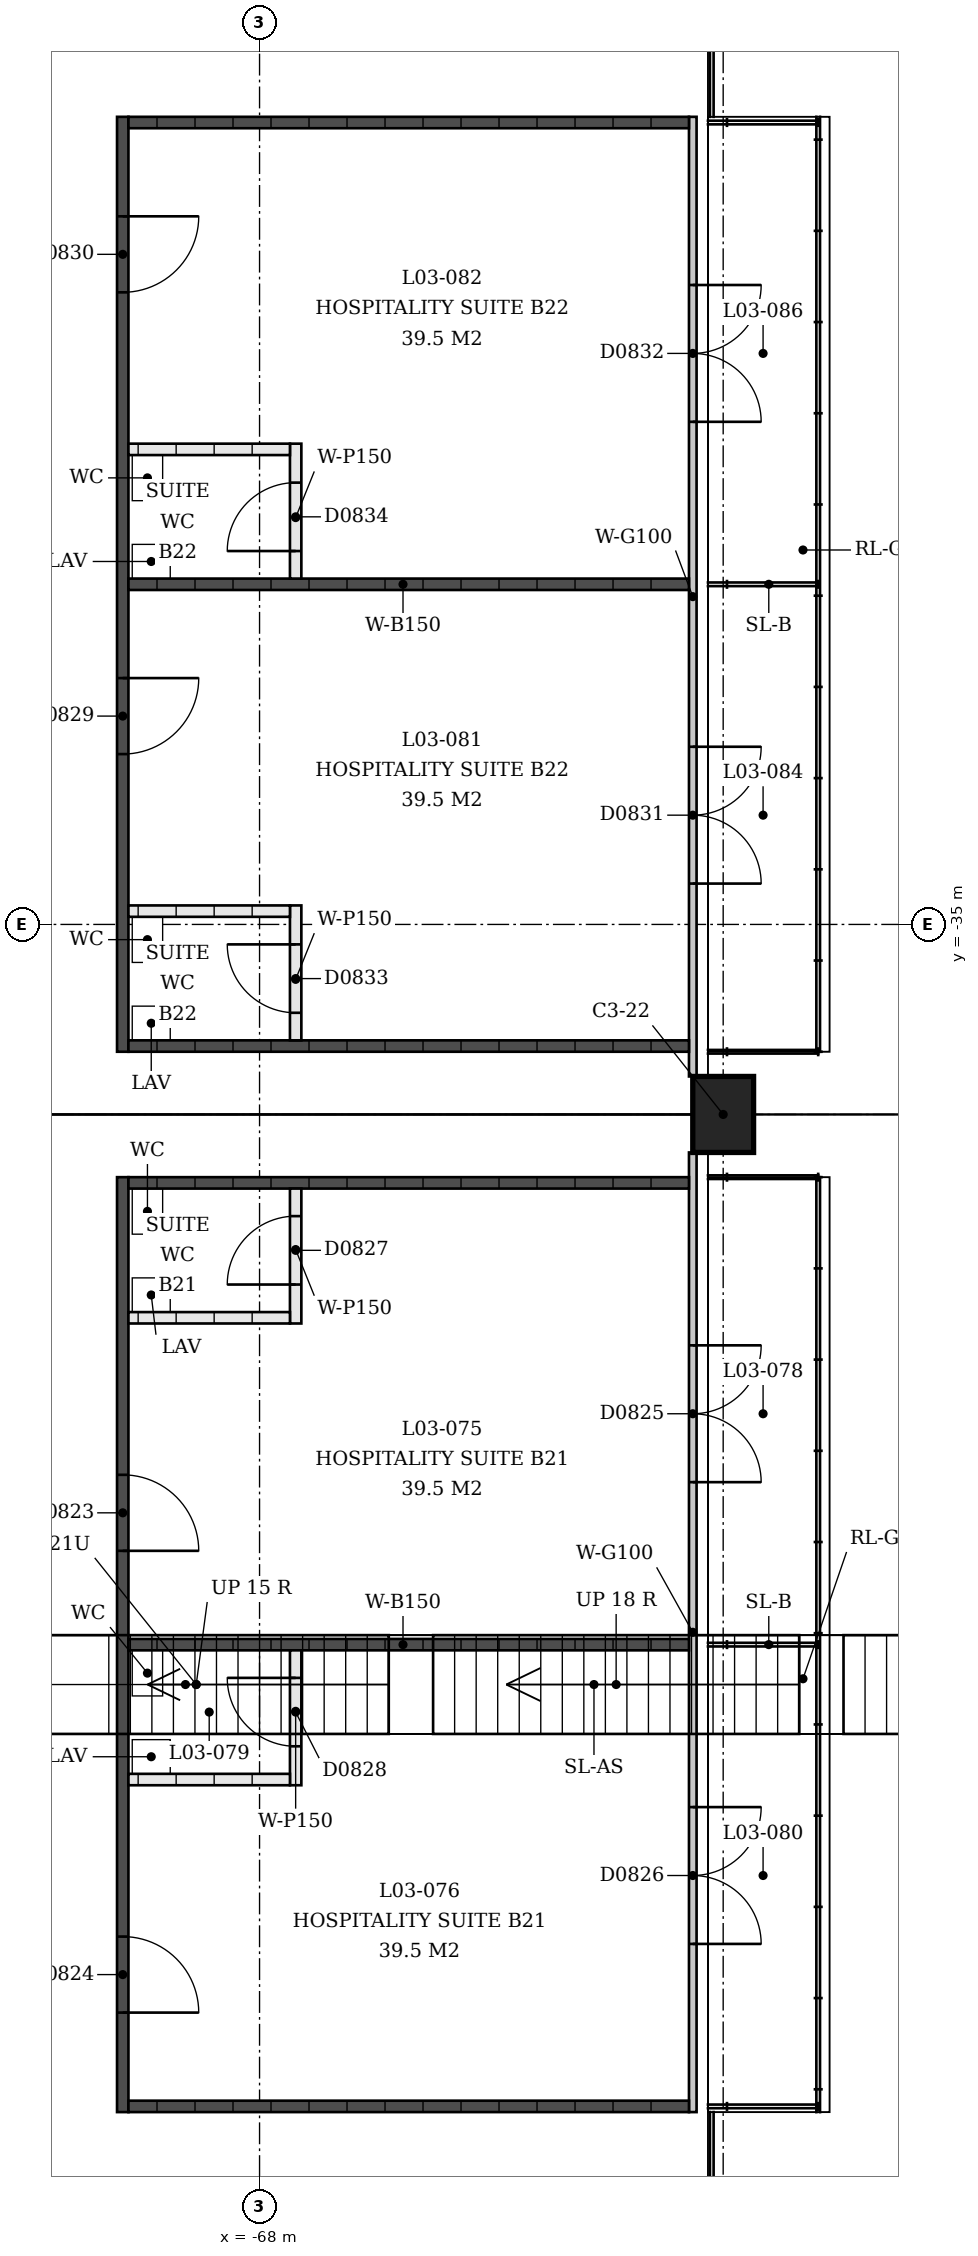
"""IFC4 building model, lengths in metres.
Left out: names, types, materials, properties, quantities, classifications, styles, units other than length and angle.
Written with IfcOpenShell. Run it as: python <this file> out.ifc"""

import sys

from ifc_helpers import new_model, si_unit, direction, frame, frame_2d, origin, origin_2d, place, context, subcontext, project, spatial, rectangle, extrude, element, fill, save


model = new_model("IFC4")
c1 = context("Model", 3, precision=1e-05, world=origin(), true_north=direction((0.0, 1.0)))
c2 = subcontext(c1, "Body", "Model", "MODEL_VIEW")
j1 = project(units=[si_unit("LENGTHUNIT", "METRE"), si_unit("PLANEANGLEUNIT", "RADIAN")], contexts=[c1])
p1 = place(None, origin())
s1 = spatial("IfcSite", under=j1, at=p1, CompositionType="ELEMENT")
p2 = place(p1, origin())
s2 = spatial("IfcBuilding", under=s1, at=p2, CompositionType="ELEMENT")
p3 = place(p2, frame((0.0, 0.0, 13.5)))
s3 = spatial("IfcBuildingStorey", under=s2, at=p3, CompositionType="ELEMENT", Elevation=13.5)
p4 = place(p3, frame((-61.9, -37.5, 0.0), z_axis=(0.0, 0.0, 1.0), x_axis=(0.0, -1.0, 0.0)))
e1 = element("IfcColumn", 1, at=p4, inside=s3, PredefinedType="COLUMN", context=c2, shape_type="SweptSolid", body=[
    extrude(rectangle(XDim=1.0, YDim=0.8, at=origin_2d()), origin(), (0.0, 0.0, 1.0), 2.033),
])
p5 = place(p3, frame((-62.3, -38.0, 0.0), z_axis=(0.0, 0.0, 1.0), x_axis=(0.0, -1.0, 0.0)))
e2 = element("IfcWall", 2, at=p5, inside=s3, PredefinedType="PARTITIONING", context=c2, shape_type="SweptSolid", body=[
    extrude(rectangle(XDim=12.625, YDim=0.1, at=frame_2d((6.312, 0.0))), origin(), (0.0, 0.0, 1.0), 3.0),
])
p6 = place(p5, frame((2.538, 0.0, 0.0)))
e3 = element("IfcOpeningElement", 3, at=p6, cuts=e2, PredefinedType="OPENING", context=c2, shape_type="SweptSolid", body=[
    extrude(rectangle(XDim=1.8, YDim=2.1, at=frame_2d((0.9, 1.05))), frame((0.0, 0.05, 0.0), z_axis=(0.0, -1.0, 0.0), x_axis=(1.0, 0.0, 0.0)), (0.0, 0.0, 1.0), 0.1),
])
p7 = place(p5, frame((8.613, 0.0, 0.0)))
e4 = element("IfcOpeningElement", 4, at=p7, cuts=e2, PredefinedType="OPENING", context=c2, shape_type="SweptSolid", body=[
    extrude(rectangle(XDim=1.8, YDim=2.1, at=frame_2d((0.9, 1.05))), frame((0.0, 0.05, 0.0), z_axis=(0.0, -1.0, 0.0), x_axis=(1.0, 0.0, 0.0)), (0.0, 0.0, 1.0), 0.1),
])
p8 = place(p3, frame((-69.8, -38.325, 0.0), z_axis=(0.0, 0.0, 1.0), x_axis=(0.0, -1.0, 0.0)))
e5 = element("IfcWall", 5, at=p8, inside=s3, PredefinedType="SOLIDWALL", context=c2, shape_type="SweptSolid", body=[
    extrude(rectangle(XDim=12.3, YDim=0.15, at=frame_2d((6.15, 0.0))), origin(), (0.0, 0.0, 1.0), 3.0),
])
p9 = place(p8, frame((3.916, 0.0, 0.0)))
e6 = element("IfcOpeningElement", 6, at=p9, cuts=e5, PredefinedType="OPENING", context=c2, shape_type="SweptSolid", body=[
    extrude(rectangle(XDim=1.0, YDim=2.1, at=frame_2d((0.5, 1.05))), frame((0.0, 0.075, 0.0), z_axis=(0.0, -1.0, 0.0), x_axis=(1.0, 0.0, 0.0)), (0.0, 0.0, 1.0), 0.15),
])
p10 = place(p8, frame((9.991, 0.0, 0.0)))
e7 = element("IfcOpeningElement", 7, at=p10, cuts=e5, PredefinedType="OPENING", context=c2, shape_type="SweptSolid", body=[
    extrude(rectangle(XDim=1.0, YDim=2.1, at=frame_2d((0.5, 1.05))), frame((0.0, 0.075, 0.0), z_axis=(0.0, -1.0, 0.0), x_axis=(1.0, 0.0, 0.0)), (0.0, 0.0, 1.0), 0.15),
])
for number, where, z_axis, x_axis in (
    (8, (-62.35, -38.4, 0.0), (0.0, 0.0, 1.0), (-1.0, 0.0, 0.0)),
    (9, (-62.35, -44.475, 0.0), (0.0, 0.0, 1.0), (-1.0, 0.0, 0.0)),
    (10, (-62.35, -50.55, 0.0), (0.0, 0.0, 1.0), (-1.0, 0.0, 0.0)),
):
    element("IfcWall", number, at=place(p3, frame(where, z_axis=z_axis, x_axis=x_axis)), inside=s3, PredefinedType="SOLIDWALL", context=c2, shape_type="SweptSolid", body=[
        extrude(rectangle(XDim=7.375, YDim=0.15, at=frame_2d((3.688, 0.0))), origin(), (0.0, 0.0, 1.0), 3.0),
    ])
p11 = place(p3, frame((-67.525, -38.475, 0.0), z_axis=(0.0, 0.0, 1.0), x_axis=(0.0, -1.0, 0.0)))
e11 = element("IfcWall", 11, at=p11, inside=s3, PredefinedType="PARTITIONING", context=c2, shape_type="SweptSolid", body=[
    extrude(rectangle(XDim=1.775, YDim=0.15, at=frame_2d((0.887, 0.0))), origin(), (0.0, 0.0, 1.0), 3.0),
])
p12 = place(p11, frame((0.363, 0.0, 0.0)))
e12 = element("IfcOpeningElement", 12, at=p12, cuts=e11, PredefinedType="OPENING", context=c2, shape_type="SweptSolid", body=[
    extrude(rectangle(XDim=0.9, YDim=2.1, at=frame_2d((0.45, 1.05))), frame((0.0, 0.075, 0.0), z_axis=(0.0, -1.0, 0.0), x_axis=(1.0, 0.0, 0.0)), (0.0, 0.0, 1.0), 0.15),
])
p13 = place(p3, frame((-67.6, -40.175, 0.0), z_axis=(0.0, 0.0, 1.0), x_axis=(-1.0, 0.0, 0.0)))
e13 = element("IfcWall", 13, at=p13, inside=s3, PredefinedType="PARTITIONING", context=c2, shape_type="SweptSolid", body=[
    extrude(rectangle(XDim=2.125, YDim=0.15, at=frame_2d((1.062, 0.0))), origin(), (0.0, 0.0, 1.0), 3.0),
])
p14 = place(p3, frame((-67.525, -44.55, 0.0), z_axis=(0.0, 0.0, 1.0), x_axis=(0.0, -1.0, 0.0)))
e14 = element("IfcWall", 14, at=p14, inside=s3, PredefinedType="PARTITIONING", context=c2, shape_type="SweptSolid", body=[
    extrude(rectangle(XDim=1.775, YDim=0.15, at=frame_2d((0.887, 0.0))), origin(), (0.0, 0.0, 1.0), 3.0),
])
p15 = place(p14, frame((0.363, 0.0, 0.0)))
e15 = element("IfcOpeningElement", 15, at=p15, cuts=e14, PredefinedType="OPENING", context=c2, shape_type="SweptSolid", body=[
    extrude(rectangle(XDim=0.9, YDim=2.1, at=frame_2d((0.45, 1.05))), frame((0.0, 0.075, 0.0), z_axis=(0.0, -1.0, 0.0), x_axis=(1.0, 0.0, 0.0)), (0.0, 0.0, 1.0), 0.15),
])
p16 = place(p3, frame((-67.6, -46.25, 0.0), z_axis=(0.0, 0.0, 1.0), x_axis=(-1.0, 0.0, 0.0)))
e16 = element("IfcWall", 16, at=p16, inside=s3, PredefinedType="PARTITIONING", context=c2, shape_type="SweptSolid", body=[
    extrude(rectangle(XDim=2.125, YDim=0.15, at=frame_2d((1.062, 0.0))), origin(), (0.0, 0.0, 1.0), 3.0),
])
p17 = place(p3, frame((-62.3, -37.0, 0.0), z_axis=(0.0, 0.0, 1.0), x_axis=(0.0, 1.0, 0.0)))
e17 = element("IfcWall", 17, at=p17, inside=s3, PredefinedType="PARTITIONING", context=c2, shape_type="SweptSolid", body=[
    extrude(rectangle(XDim=12.625, YDim=0.1, at=frame_2d((6.312, 0.0))), origin(), (0.0, 0.0, 1.0), 3.0),
])
p18 = place(p17, frame((2.538, 0.0, 0.0)))
e18 = element("IfcOpeningElement", 18, at=p18, cuts=e17, PredefinedType="OPENING", context=c2, shape_type="SweptSolid", body=[
    extrude(rectangle(XDim=1.8, YDim=2.1, at=frame_2d((0.9, 1.05))), frame((0.0, 0.05, 0.0), z_axis=(0.0, -1.0, 0.0), x_axis=(1.0, 0.0, 0.0)), (0.0, 0.0, 1.0), 0.1),
])
p19 = place(p17, frame((8.613, 0.0, 0.0)))
e19 = element("IfcOpeningElement", 19, at=p19, cuts=e17, PredefinedType="OPENING", context=c2, shape_type="SweptSolid", body=[
    extrude(rectangle(XDim=1.8, YDim=2.1, at=frame_2d((0.9, 1.05))), frame((0.0, 0.05, 0.0), z_axis=(0.0, -1.0, 0.0), x_axis=(1.0, 0.0, 0.0)), (0.0, 0.0, 1.0), 0.1),
])
p20 = place(p3, frame((-69.8, -36.675, 0.0), z_axis=(0.0, 0.0, 1.0), x_axis=(0.0, 1.0, 0.0)))
e20 = element("IfcWall", 20, at=p20, inside=s3, PredefinedType="SOLIDWALL", context=c2, shape_type="SweptSolid", body=[
    extrude(rectangle(XDim=12.3, YDim=0.15, at=frame_2d((6.15, 0.0))), origin(), (0.0, 0.0, 1.0), 3.0),
])
p21 = place(p20, frame((3.916, 0.0, 0.0)))
e21 = element("IfcOpeningElement", 21, at=p21, cuts=e20, PredefinedType="OPENING", context=c2, shape_type="SweptSolid", body=[
    extrude(rectangle(XDim=1.0, YDim=2.1, at=frame_2d((0.5, 1.05))), frame((0.0, 0.075, 0.0), z_axis=(0.0, -1.0, 0.0), x_axis=(1.0, 0.0, 0.0)), (0.0, 0.0, 1.0), 0.15),
])
p22 = place(p20, frame((9.991, 0.0, 0.0)))
e22 = element("IfcOpeningElement", 22, at=p22, cuts=e20, PredefinedType="OPENING", context=c2, shape_type="SweptSolid", body=[
    extrude(rectangle(XDim=1.0, YDim=2.1, at=frame_2d((0.5, 1.05))), frame((0.0, 0.075, 0.0), z_axis=(0.0, -1.0, 0.0), x_axis=(1.0, 0.0, 0.0)), (0.0, 0.0, 1.0), 0.15),
])
for number, where, z_axis, x_axis in (
    (23, (-62.35, -36.6, 0.0), (0.0, 0.0, 1.0), (-1.0, 0.0, 0.0)),
    (24, (-62.35, -30.525, 0.0), (0.0, 0.0, 1.0), (-1.0, 0.0, 0.0)),
    (25, (-62.35, -24.45, 0.0), (0.0, 0.0, 1.0), (-1.0, 0.0, 0.0)),
):
    element("IfcWall", number, at=place(p3, frame(where, z_axis=z_axis, x_axis=x_axis)), inside=s3, PredefinedType="SOLIDWALL", context=c2, shape_type="SweptSolid", body=[
        extrude(rectangle(XDim=7.375, YDim=0.15, at=frame_2d((3.688, 0.0))), origin(), (0.0, 0.0, 1.0), 3.0),
    ])
p23 = place(p3, frame((-67.525, -36.525, 0.0), z_axis=(0.0, 0.0, 1.0), x_axis=(0.0, 1.0, 0.0)))
e26 = element("IfcWall", 26, at=p23, inside=s3, PredefinedType="PARTITIONING", context=c2, shape_type="SweptSolid", body=[
    extrude(rectangle(XDim=1.775, YDim=0.15, at=frame_2d((0.887, 0.0))), origin(), (0.0, 0.0, 1.0), 3.0),
])
p24 = place(p23, frame((0.363, 0.0, 0.0)))
e27 = element("IfcOpeningElement", 27, at=p24, cuts=e26, PredefinedType="OPENING", context=c2, shape_type="SweptSolid", body=[
    extrude(rectangle(XDim=0.9, YDim=2.1, at=frame_2d((0.45, 1.05))), frame((0.0, 0.075, 0.0), z_axis=(0.0, -1.0, 0.0), x_axis=(1.0, 0.0, 0.0)), (0.0, 0.0, 1.0), 0.15),
])
p25 = place(p3, frame((-67.6, -34.825, 0.0), z_axis=(0.0, 0.0, 1.0), x_axis=(-1.0, 0.0, 0.0)))
e28 = element("IfcWall", 28, at=p25, inside=s3, PredefinedType="PARTITIONING", context=c2, shape_type="SweptSolid", body=[
    extrude(rectangle(XDim=2.125, YDim=0.15, at=frame_2d((1.062, 0.0))), origin(), (0.0, 0.0, 1.0), 3.0),
])
p26 = place(p3, frame((-67.525, -30.45, 0.0), z_axis=(0.0, 0.0, 1.0), x_axis=(0.0, 1.0, 0.0)))
e29 = element("IfcWall", 29, at=p26, inside=s3, PredefinedType="PARTITIONING", context=c2, shape_type="SweptSolid", body=[
    extrude(rectangle(XDim=1.775, YDim=0.15, at=frame_2d((0.887, 0.0))), origin(), (0.0, 0.0, 1.0), 3.0),
])
p27 = place(p26, frame((0.363, 0.0, 0.0)))
e30 = element("IfcOpeningElement", 30, at=p27, cuts=e29, PredefinedType="OPENING", context=c2, shape_type="SweptSolid", body=[
    extrude(rectangle(XDim=0.9, YDim=2.1, at=frame_2d((0.45, 1.05))), frame((0.0, 0.075, 0.0), z_axis=(0.0, -1.0, 0.0), x_axis=(1.0, 0.0, 0.0)), (0.0, 0.0, 1.0), 0.15),
])
p28 = place(p3, frame((-67.6, -28.75, 0.0), z_axis=(0.0, 0.0, 1.0), x_axis=(-1.0, 0.0, 0.0)))
e31 = element("IfcWall", 31, at=p28, inside=s3, PredefinedType="PARTITIONING", context=c2, shape_type="SweptSolid", body=[
    extrude(rectangle(XDim=2.125, YDim=0.15, at=frame_2d((1.062, 0.0))), origin(), (0.0, 0.0, 1.0), 3.0),
])
p29 = place(p9, origin())
e32 = element("IfcDoor", 32, at=p29, inside=s3, OperationType="SINGLE_SWING_LEFT", PredefinedType="DOOR", context=c2, shape_type="SweptSolid", body=[
    extrude(rectangle(XDim=1.0, YDim=2.1, at=frame_2d((0.5, 1.05))), frame((0.0, 0.025, 0.0), z_axis=(0.0, -1.0, 0.0), x_axis=(1.0, 0.0, 0.0)), (0.0, 0.0, 1.0), 0.05),
])
fill(e6, e32)
p30 = place(p10, origin())
e33 = element("IfcDoor", 33, at=p30, inside=s3, OperationType="SINGLE_SWING_LEFT", PredefinedType="DOOR", context=c2, shape_type="SweptSolid", body=[
    extrude(rectangle(XDim=1.0, YDim=2.1, at=frame_2d((0.5, 1.05))), frame((0.0, 0.025, 0.0), z_axis=(0.0, -1.0, 0.0), x_axis=(1.0, 0.0, 0.0)), (0.0, 0.0, 1.0), 0.05),
])
fill(e7, e33)
p31 = place(p6, origin())
e34 = element("IfcDoor", 34, at=p31, inside=s3, OperationType="DOUBLE_DOOR_SINGLE_SWING", PredefinedType="DOOR", context=c2, shape_type="SweptSolid", body=[
    extrude(rectangle(XDim=1.8, YDim=2.1, at=frame_2d((0.9, 1.05))), frame((0.0, 0.025, 0.0), z_axis=(0.0, -1.0, 0.0), x_axis=(1.0, 0.0, 0.0)), (0.0, 0.0, 1.0), 0.05),
])
fill(e3, e34)
p32 = place(p7, origin())
e35 = element("IfcDoor", 35, at=p32, inside=s3, OperationType="DOUBLE_DOOR_SINGLE_SWING", PredefinedType="DOOR", context=c2, shape_type="SweptSolid", body=[
    extrude(rectangle(XDim=1.8, YDim=2.1, at=frame_2d((0.9, 1.05))), frame((0.0, 0.025, 0.0), z_axis=(0.0, -1.0, 0.0), x_axis=(1.0, 0.0, 0.0)), (0.0, 0.0, 1.0), 0.05),
])
fill(e4, e35)
p33 = place(p12, origin())
e36 = element("IfcDoor", 36, at=p33, inside=s3, OperationType="SINGLE_SWING_RIGHT", PredefinedType="DOOR", context=c2, shape_type="SweptSolid", body=[
    extrude(rectangle(XDim=0.9, YDim=2.1, at=frame_2d((0.45, 1.05))), frame((0.0, 0.025, 0.0), z_axis=(0.0, -1.0, 0.0), x_axis=(1.0, 0.0, 0.0)), (0.0, 0.0, 1.0), 0.05),
])
fill(e12, e36)
p34 = place(p15, origin())
e37 = element("IfcDoor", 37, at=p34, inside=s3, OperationType="SINGLE_SWING_LEFT", PredefinedType="DOOR", context=c2, shape_type="SweptSolid", body=[
    extrude(rectangle(XDim=0.9, YDim=2.1, at=frame_2d((0.45, 1.05))), frame((0.0, 0.025, 0.0), z_axis=(0.0, -1.0, 0.0), x_axis=(1.0, 0.0, 0.0)), (0.0, 0.0, 1.0), 0.05),
])
fill(e15, e37)
p35 = place(p21, origin())
e38 = element("IfcDoor", 38, at=p35, inside=s3, OperationType="SINGLE_SWING_RIGHT", PredefinedType="DOOR", context=c2, shape_type="SweptSolid", body=[
    extrude(rectangle(XDim=1.0, YDim=2.1, at=frame_2d((0.5, 1.05))), frame((0.0, 0.025, 0.0), z_axis=(0.0, -1.0, 0.0), x_axis=(1.0, 0.0, 0.0)), (0.0, 0.0, 1.0), 0.05),
])
fill(e21, e38)
p36 = place(p22, origin())
e39 = element("IfcDoor", 39, at=p36, inside=s3, OperationType="SINGLE_SWING_RIGHT", PredefinedType="DOOR", context=c2, shape_type="SweptSolid", body=[
    extrude(rectangle(XDim=1.0, YDim=2.1, at=frame_2d((0.5, 1.05))), frame((0.0, 0.025, 0.0), z_axis=(0.0, -1.0, 0.0), x_axis=(1.0, 0.0, 0.0)), (0.0, 0.0, 1.0), 0.05),
])
fill(e22, e39)
p37 = place(p18, origin())
e40 = element("IfcDoor", 40, at=p37, inside=s3, OperationType="DOUBLE_DOOR_SINGLE_SWING", PredefinedType="DOOR", context=c2, shape_type="SweptSolid", body=[
    extrude(rectangle(XDim=1.8, YDim=2.1, at=frame_2d((0.9, 1.05))), frame((0.0, 0.025, 0.0), z_axis=(0.0, -1.0, 0.0), x_axis=(1.0, 0.0, 0.0)), (0.0, 0.0, 1.0), 0.05),
])
fill(e18, e40)
p38 = place(p19, origin())
e41 = element("IfcDoor", 41, at=p38, inside=s3, OperationType="DOUBLE_DOOR_SINGLE_SWING", PredefinedType="DOOR", context=c2, shape_type="SweptSolid", body=[
    extrude(rectangle(XDim=1.8, YDim=2.1, at=frame_2d((0.9, 1.05))), frame((0.0, 0.025, 0.0), z_axis=(0.0, -1.0, 0.0), x_axis=(1.0, 0.0, 0.0)), (0.0, 0.0, 1.0), 0.05),
])
fill(e19, e41)
p39 = place(p24, origin())
e42 = element("IfcDoor", 42, at=p39, inside=s3, OperationType="SINGLE_SWING_LEFT", PredefinedType="DOOR", context=c2, shape_type="SweptSolid", body=[
    extrude(rectangle(XDim=0.9, YDim=2.1, at=frame_2d((0.45, 1.05))), frame((0.0, 0.025, 0.0), z_axis=(0.0, -1.0, 0.0), x_axis=(1.0, 0.0, 0.0)), (0.0, 0.0, 1.0), 0.05),
])
fill(e27, e42)
p40 = place(p27, origin())
e43 = element("IfcDoor", 43, at=p40, inside=s3, OperationType="SINGLE_SWING_RIGHT", PredefinedType="DOOR", context=c2, shape_type="SweptSolid", body=[
    extrude(rectangle(XDim=0.9, YDim=2.1, at=frame_2d((0.45, 1.05))), frame((0.0, 0.025, 0.0), z_axis=(0.0, -1.0, 0.0), x_axis=(1.0, 0.0, 0.0)), (0.0, 0.0, 1.0), 0.05),
])
fill(e30, e43)
save(model, sys.argv[1])
